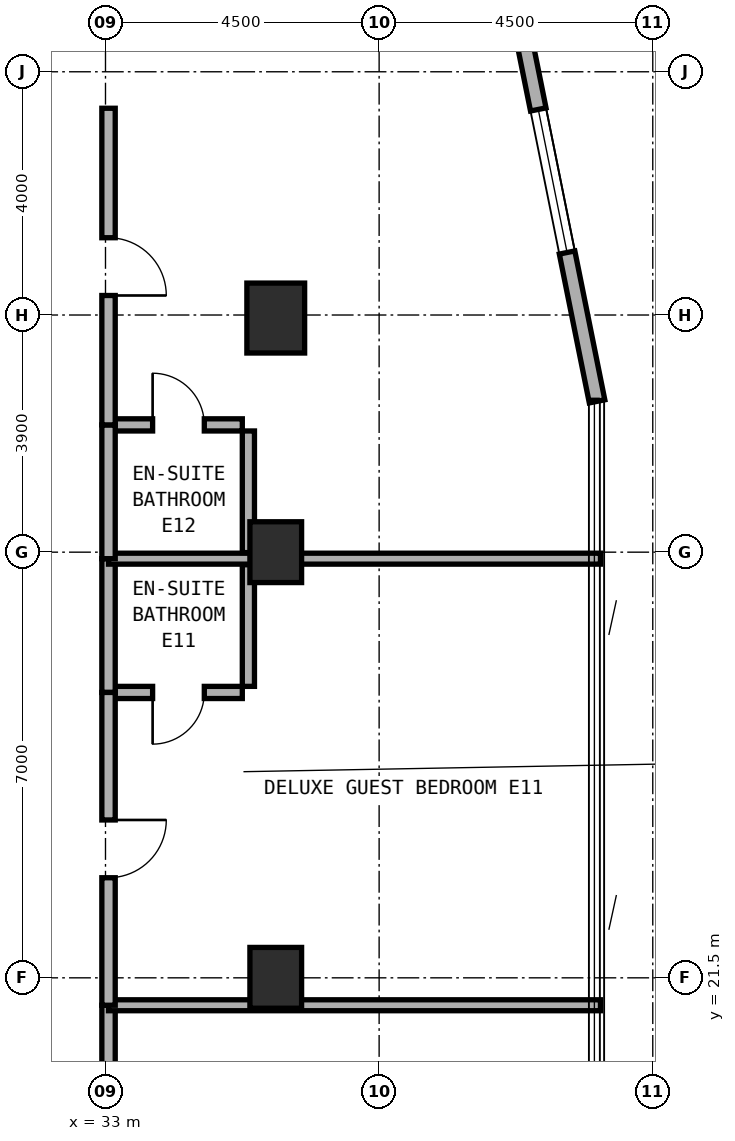
"""IFC4 building model, lengths in metres.
Left out: names, types, materials, properties, quantities, classifications, styles, units other than length and angle.
Written with IfcOpenShell. Run it as: python <this file> out.ifc"""

import sys

from ifc_helpers import new_model, si_unit, direction, frame, frame_2d, origin, origin_2d, place, context, subcontext, project, spatial, rectangle, extrude, element, fill, save


model = new_model("IFC4")
c1 = context("Model", 3, precision=1e-05, world=origin(), true_north=direction((0.0, 1.0)))
c2 = subcontext(c1, "Body", "Model", "MODEL_VIEW")
j1 = project(units=[si_unit("LENGTHUNIT", "METRE"), si_unit("PLANEANGLEUNIT", "RADIAN")], contexts=[c1])
p1 = place(None, origin())
s1 = spatial("IfcSite", under=j1, at=p1, CompositionType="ELEMENT")
p2 = place(p1, origin())
s2 = spatial("IfcBuilding", under=s1, at=p2, CompositionType="ELEMENT")
p3 = place(p2, frame((0.0, 0.0, 98.5)))
s3 = spatial("IfcBuildingStorey", under=s2, at=p3, CompositionType="ELEMENT", Elevation=98.5)
for number, where, z_axis, x_axis in (
    (1, (35.8, 21.5, 0.0), (0.0, 0.0, 1.0), (1.0, 0.0, 0.0)),
    (2, (35.8, 28.5, 0.0), (0.0, 0.0, 1.0), (1.0, 0.0, 0.0)),
):
    element("IfcColumn", number, at=place(p3, frame(where, z_axis=z_axis, x_axis=x_axis)), inside=s3, PredefinedType="COLUMN", context=c2, shape_type="SweptSolid", body=[
        extrude(rectangle(XDim=0.85, YDim=1.0, at=origin_2d()), origin(), (0.0, 0.0, 1.0), 3.5),
    ])
p4 = place(p3, frame((35.8, 32.35, 0.0), z_axis=(0.0, 0.0, 1.0), x_axis=(1.0, 0.0, 0.0)))
e3 = element("IfcColumn", 3, at=p4, inside=s3, PredefinedType="COLUMN", context=c2, shape_type="SweptSolid", body=[
    extrude(rectangle(XDim=0.95, YDim=1.15, at=origin_2d()), origin(), (0.0, 0.0, 1.0), 3.5),
])
p5 = place(p3, frame((41.084, 30.98, 0.0), z_axis=(0.0, 0.0, 1.0), x_axis=(-0.197435082048, 0.980315963543, 0.0)))
e4 = element("IfcWall", 4, at=p5, inside=s3, PredefinedType="STANDARD", context=c2, shape_type="SweptSolid", body=[
    extrude(rectangle(XDim=9.183, YDim=0.26, at=frame_2d((4.591, 0.0))), origin(), (0.0, 0.0, 1.0), 3.22),
])
p6 = place(p5, frame((2.497, 0.0, 0.8)))
e5 = element("IfcOpeningElement", 5, at=p6, cuts=e4, PredefinedType="OPENING", context=c2, shape_type="SweptSolid", body=[
    extrude(rectangle(XDim=2.4, YDim=1.6, at=frame_2d((1.2, 0.8))), frame((0.0, 0.14, 0.0), z_axis=(0.0, -1.0, 0.0), x_axis=(1.0, 0.0, 0.0)), (0.0, 0.0, 1.0), 0.28),
])
p7 = place(p3, frame((33.05, 16.4, 0.0), z_axis=(0.0, 0.0, 1.0), x_axis=(0.0, 1.0, 0.0)))
e6 = element("IfcWall", 6, at=p7, inside=s3, PredefinedType="SOLIDWALL", context=c2, shape_type="SweptSolid", body=[
    extrude(rectangle(XDim=4.649, YDim=0.22, at=frame_2d((2.325, 0.0))), origin(), (0.0, 0.0, 1.0), 2.595),
])
p8 = place(p7, frame((1.85, 0.0, 0.0)))
e7 = element("IfcOpeningElement", 7, at=p8, cuts=e6, PredefinedType="OPENING", context=c2, shape_type="SweptSolid", body=[
    extrude(rectangle(XDim=0.95, YDim=2.1, at=frame_2d((0.475, 1.05))), frame((0.0, 0.12, 0.0), z_axis=(0.0, -1.0, 0.0), x_axis=(1.0, 0.0, 0.0)), (0.0, 0.0, 1.0), 0.24),
])
p9 = place(p3, frame((33.05, 21.049, 0.0), z_axis=(0.0, 0.0, 1.0), x_axis=(1.0, 0.0, 0.0)))
e8 = element("IfcWall", 8, at=p9, inside=s3, PredefinedType="SOLIDWALL", context=c2, shape_type="SweptSolid", body=[
    extrude(rectangle(XDim=8.09, YDim=0.18, at=frame_2d((4.045, 0.0))), origin(), (0.0, 0.0, 1.0), 2.835),
])
p10 = place(p3, frame((33.15, 26.193, 0.0), z_axis=(0.0, 0.0, 1.0), x_axis=(1.0, 0.0, 0.0)))
e9 = element("IfcWall", 9, at=p10, inside=s3, PredefinedType="PLUMBINGWALL", context=c2, shape_type="SweptSolid", body=[
    extrude(rectangle(XDim=2.1, YDim=0.2, at=frame_2d((1.05, 0.0))), origin(), (0.0, 0.0, 1.0), 3.22),
])
p11 = place(p10, frame((0.625, 0.0, 0.0)))
e10 = element("IfcOpeningElement", 10, at=p11, cuts=e9, PredefinedType="OPENING", context=c2, shape_type="SweptSolid", body=[
    extrude(rectangle(XDim=0.85, YDim=2.1, at=frame_2d((0.425, 1.05))), frame((0.0, 0.11, 0.0), z_axis=(0.0, -1.0, 0.0), x_axis=(1.0, 0.0, 0.0)), (0.0, 0.0, 1.0), 0.22),
])
p12 = place(p3, frame((35.35, 26.293, 0.0), z_axis=(0.0, 0.0, 1.0), x_axis=(0.0, 1.0, 0.0)))
e11 = element("IfcWall", 11, at=p12, inside=s3, PredefinedType="PLUMBINGWALL", context=c2, shape_type="SweptSolid", body=[
    extrude(rectangle(XDim=2.0, YDim=0.2, at=frame_2d((1.0, 0.0))), origin(), (0.0, 0.0, 1.0), 3.22),
])
p13 = place(p3, frame((33.05, 26.193, 0.0), z_axis=(0.0, 0.0, 1.0), x_axis=(0.0, 1.0, 0.0)))
e12 = element("IfcWall", 12, at=p13, inside=s3, PredefinedType="SOLIDWALL", context=c2, shape_type="SweptSolid", body=[
    extrude(rectangle(XDim=2.2, YDim=0.22, at=frame_2d((1.1, 0.0))), origin(), (0.0, 0.0, 1.0), 3.22),
])
p14 = place(p3, frame((33.05, 21.049, 0.0), z_axis=(0.0, 0.0, 1.0), x_axis=(0.0, 1.0, 0.0)))
e13 = element("IfcWall", 13, at=p14, inside=s3, PredefinedType="SOLIDWALL", context=c2, shape_type="SweptSolid", body=[
    extrude(rectangle(XDim=5.144, YDim=0.22, at=frame_2d((2.572, 0.0))), origin(), (0.0, 0.0, 1.0), 2.595),
])
p15 = place(p14, frame((2.097, 0.0, 0.0)))
e14 = element("IfcOpeningElement", 14, at=p15, cuts=e13, PredefinedType="OPENING", context=c2, shape_type="SweptSolid", body=[
    extrude(rectangle(XDim=0.95, YDim=2.1, at=frame_2d((0.475, 1.05))), frame((0.0, 0.12, 0.0), z_axis=(0.0, -1.0, 0.0), x_axis=(1.0, 0.0, 0.0)), (0.0, 0.0, 1.0), 0.24),
])
p16 = place(p3, frame((33.05, 28.393, 0.0), z_axis=(0.0, 0.0, 1.0), x_axis=(1.0, 0.0, 0.0)))
e15 = element("IfcWall", 15, at=p16, inside=s3, PredefinedType="SOLIDWALL", context=c2, shape_type="SweptSolid", body=[
    extrude(rectangle(XDim=8.09, YDim=0.18, at=frame_2d((4.045, 0.0))), origin(), (0.0, 0.0, 1.0), 2.595),
])
p17 = place(p3, frame((33.15, 30.593, 0.0), z_axis=(0.0, 0.0, 1.0), x_axis=(1.0, 0.0, 0.0)))
e16 = element("IfcWall", 16, at=p17, inside=s3, PredefinedType="PLUMBINGWALL", context=c2, shape_type="SweptSolid", body=[
    extrude(rectangle(XDim=2.1, YDim=0.2, at=frame_2d((1.05, 0.0))), origin(), (0.0, 0.0, 1.0), 3.22),
])
p18 = place(p17, frame((0.625, 0.0, 0.0)))
e17 = element("IfcOpeningElement", 17, at=p18, cuts=e16, PredefinedType="OPENING", context=c2, shape_type="SweptSolid", body=[
    extrude(rectangle(XDim=0.85, YDim=2.1, at=frame_2d((0.425, 1.05))), frame((0.0, 0.11, 0.0), z_axis=(0.0, -1.0, 0.0), x_axis=(1.0, 0.0, 0.0)), (0.0, 0.0, 1.0), 0.22),
])
p19 = place(p3, frame((35.35, 28.493, 0.0), z_axis=(0.0, 0.0, 1.0), x_axis=(0.0, 1.0, 0.0)))
e18 = element("IfcWall", 18, at=p19, inside=s3, PredefinedType="PLUMBINGWALL", context=c2, shape_type="SweptSolid", body=[
    extrude(rectangle(XDim=2.0, YDim=0.2, at=frame_2d((1.0, 0.0))), origin(), (0.0, 0.0, 1.0), 2.595),
])
p20 = place(p3, frame((33.05, 28.393, 0.0), z_axis=(0.0, 0.0, 1.0), x_axis=(0.0, 1.0, 0.0)))
e19 = element("IfcWall", 19, at=p20, inside=s3, PredefinedType="SOLIDWALL", context=c2, shape_type="SweptSolid", body=[
    extrude(rectangle(XDim=2.2, YDim=0.22, at=frame_2d((1.1, 0.0))), origin(), (0.0, 0.0, 1.0), 2.595),
])
p21 = place(p3, frame((33.05, 30.593, 0.0), z_axis=(0.0, 0.0, 1.0), x_axis=(0.0, 1.0, 0.0)))
e20 = element("IfcWall", 20, at=p21, inside=s3, PredefinedType="SOLIDWALL", context=c2, shape_type="SweptSolid", body=[
    extrude(rectangle(XDim=5.207, YDim=0.22, at=frame_2d((2.604, 0.0))), origin(), (0.0, 0.0, 1.0), 2.595),
])
p22 = place(p21, frame((2.128, 0.0, 0.0)))
e21 = element("IfcOpeningElement", 21, at=p22, cuts=e20, PredefinedType="OPENING", context=c2, shape_type="SweptSolid", body=[
    extrude(rectangle(XDim=0.95, YDim=2.1, at=frame_2d((0.475, 1.05))), frame((0.0, 0.12, 0.0), z_axis=(0.0, -1.0, 0.0), x_axis=(1.0, 0.0, 0.0)), (0.0, 0.0, 1.0), 0.24),
])
p23 = place(p6, origin())
e22 = element("IfcWindow", 22, at=p23, inside=s3, PartitioningType="SINGLE_PANEL", PredefinedType="WINDOW", context=c2, shape_type="SweptSolid", body=[
    extrude(rectangle(XDim=2.4, YDim=1.6, at=frame_2d((1.2, 0.8))), frame((0.0, 0.03, 0.0), z_axis=(0.0, -1.0, 0.0), x_axis=(1.0, 0.0, 0.0)), (0.0, 0.0, 1.0), 0.06),
])
fill(e5, e22)
p24 = place(p11, frame((0.85, 0.0, 0.0), z_axis=(0.0, 0.0, 1.0), x_axis=(-1.0, 0.0, 0.0)))
e23 = element("IfcDoor", 23, at=p24, inside=s3, OperationType="SINGLE_SWING_RIGHT", PredefinedType="DOOR", context=c2, shape_type="SweptSolid", body=[
    extrude(rectangle(XDim=0.85, YDim=2.1, at=frame_2d((0.425, 1.05))), frame((0.0, 0.025, 0.0), z_axis=(0.0, -1.0, 0.0), x_axis=(1.0, 0.0, 0.0)), (0.0, 0.0, 1.0), 0.05),
])
fill(e10, e23)
p25 = place(p15, frame((0.95, 0.0, 0.0), z_axis=(0.0, 0.0, 1.0), x_axis=(-1.0, 0.0, 0.0)))
e24 = element("IfcDoor", 24, at=p25, inside=s3, OperationType="SINGLE_SWING_LEFT", PredefinedType="DOOR", context=c2, shape_type="SweptSolid", body=[
    extrude(rectangle(XDim=0.95, YDim=2.1, at=frame_2d((0.475, 1.05))), frame((0.0, 0.025, 0.0), z_axis=(0.0, -1.0, 0.0), x_axis=(1.0, 0.0, 0.0)), (0.0, 0.0, 1.0), 0.05),
])
fill(e14, e24)
p26 = place(p18, origin())
e25 = element("IfcDoor", 25, at=p26, inside=s3, OperationType="SINGLE_SWING_LEFT", PredefinedType="DOOR", context=c2, shape_type="SweptSolid", body=[
    extrude(rectangle(XDim=0.85, YDim=2.1, at=frame_2d((0.425, 1.05))), frame((0.0, 0.025, 0.0), z_axis=(0.0, -1.0, 0.0), x_axis=(1.0, 0.0, 0.0)), (0.0, 0.0, 1.0), 0.05),
])
fill(e17, e25)
p27 = place(p22, frame((0.95, 0.0, 0.0), z_axis=(0.0, 0.0, 1.0), x_axis=(-1.0, 0.0, 0.0)))
e26 = element("IfcDoor", 26, at=p27, inside=s3, OperationType="SINGLE_SWING_RIGHT", PredefinedType="DOOR", context=c2, shape_type="SweptSolid", body=[
    extrude(rectangle(XDim=0.95, YDim=2.1, at=frame_2d((0.475, 1.05))), frame((0.0, 0.025, 0.0), z_axis=(0.0, -1.0, 0.0), x_axis=(1.0, 0.0, 0.0)), (0.0, 0.0, 1.0), 0.05),
])
fill(e21, e26)
save(model, sys.argv[1])
